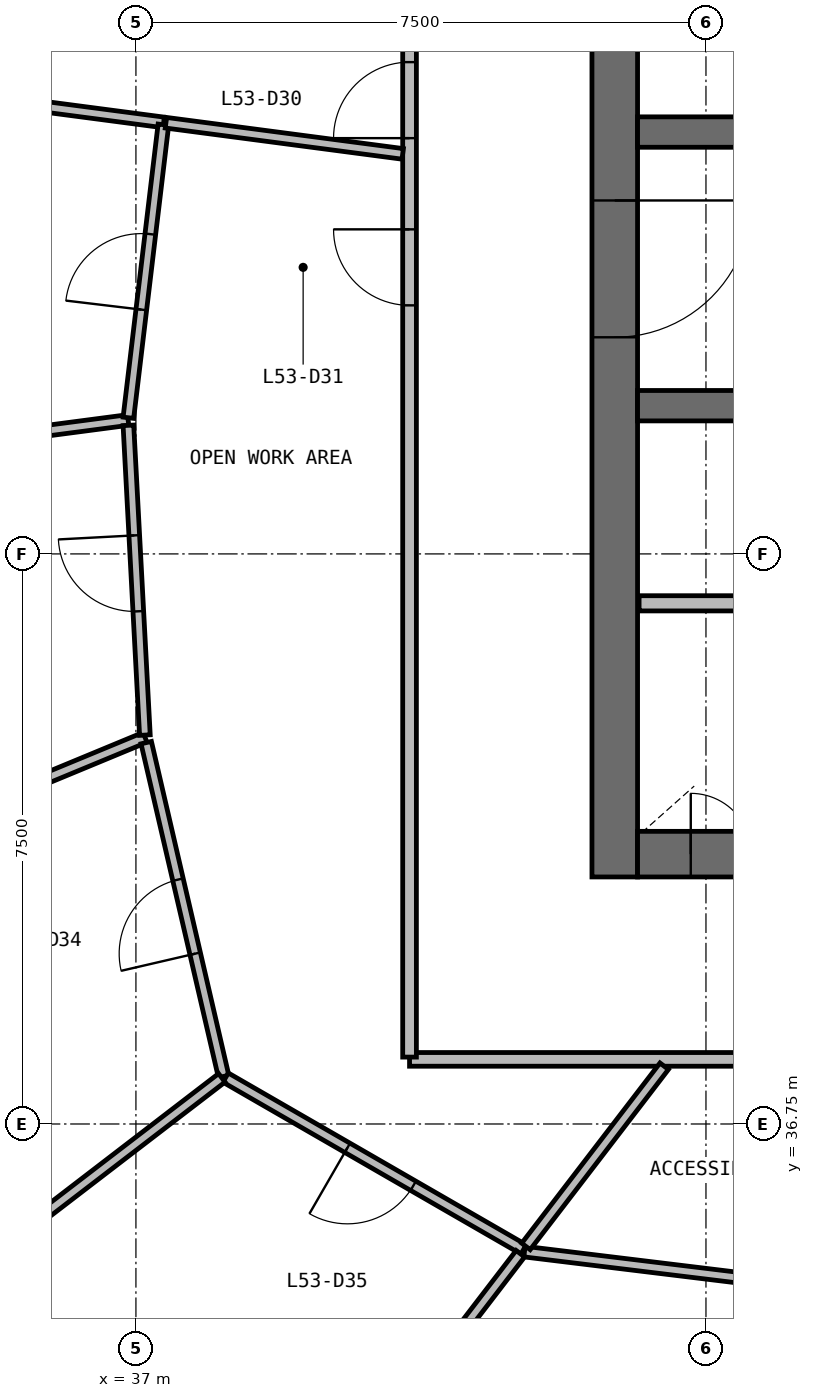
"""IFC4 building model, lengths in metres.
Left out: names, types, materials, properties, quantities, classifications, styles, units other than length and angle.
Written with IfcOpenShell. Run it as: python <this file> out.ifc"""

import sys

from ifc_helpers import new_model, si_unit, direction, frame, frame_2d, origin, place, context, subcontext, project, spatial, rectangle, extrude, source, transform, mapped, element, fill, save


model = new_model("IFC4")
c1 = context("Model", 3, precision=1e-05, world=origin(), true_north=direction((0.0, 1.0)))
c2 = subcontext(c1, "Body", "Model", "MODEL_VIEW")
j1 = project(units=[si_unit("LENGTHUNIT", "METRE"), si_unit("PLANEANGLEUNIT", "RADIAN")], contexts=[c1])
p1 = place(None, origin())
s1 = spatial("IfcSite", under=j1, at=p1, CompositionType="ELEMENT")
p2 = place(p1, origin())
s2 = spatial("IfcBuilding", under=s1, at=p2, CompositionType="ELEMENT")
p3 = place(p2, frame((0.0, 0.0, 218.9)))
s3 = spatial("IfcBuildingStorey", under=s2, at=p3, CompositionType="ELEMENT", Elevation=218.9)
p4 = place(p3, frame((43.3, 56.0, 0.0), z_axis=(0.0, 0.0, 1.0), x_axis=(0.0, -1.0, 0.0)))
e1 = element("IfcWall", 1, at=p4, inside=s3, PredefinedType="SHEAR", context=c2, shape_type="SweptSolid", body=[
    extrude(rectangle(XDim=16.0, YDim=0.6, at=frame_2d((8.0, 0.0))), origin(), (0.0, 0.0, 1.0), 3.9),
])
p5 = place(p4, frame((7.1, 0.0, 0.0)))
e2 = element("IfcOpeningElement", 2, at=p5, cuts=e1, PredefinedType="OPENING", context=c2, shape_type="SweptSolid", body=[
    extrude(rectangle(XDim=1.8, YDim=2.1, at=frame_2d((0.9, 1.05))), frame((0.0, 0.31, 0.0), z_axis=(0.0, -1.0, 0.0), x_axis=(1.0, 0.0, 0.0)), (0.0, 0.0, 1.0), 0.62),
])
p6 = place(p3, frame((43.6, 40.3, 0.0), z_axis=(0.0, 0.0, 1.0), x_axis=(1.0, 0.0, 0.0)))
e3 = element("IfcWall", 3, at=p6, inside=s3, PredefinedType="SHEAR", context=c2, shape_type="SweptSolid", body=[
    extrude(rectangle(XDim=16.8, YDim=0.6, at=frame_2d((8.4, 0.0))), origin(), (0.0, 0.0, 1.0), 3.9),
])
p7 = place(p6, frame((10.3, 0.0, 0.0)))
e4 = element("IfcOpeningElement", 4, at=p7, cuts=e3, PredefinedType="OPENING", context=c2, shape_type="SweptSolid", body=[
    extrude(rectangle(XDim=1.2, YDim=2.1, at=frame_2d((0.6, 1.05))), frame((0.0, 0.31, 0.0), z_axis=(0.0, -1.0, 0.0), x_axis=(1.0, 0.0, 0.0)), (0.0, 0.0, 1.0), 0.62),
])
p8 = place(p6, frame((7.25, 0.0, 0.0)))
e5 = element("IfcOpeningElement", 5, at=p8, cuts=e3, PredefinedType="OPENING", context=c2, shape_type="SweptSolid", body=[
    extrude(rectangle(XDim=1.1, YDim=2.1, at=frame_2d((0.55, 1.05))), frame((0.0, 0.31, 0.0), z_axis=(0.0, -1.0, 0.0), x_axis=(1.0, 0.0, 0.0)), (0.0, 0.0, 1.0), 0.62),
])
p9 = place(p6, frame((0.7, 0.0, 0.0)))
e6 = element("IfcOpeningElement", 6, at=p9, cuts=e3, PredefinedType="OPENING", context=c2, shape_type="SweptSolid", body=[
    extrude(rectangle(XDim=0.8, YDim=2.1, at=frame_2d((0.4, 1.05))), frame((0.0, 0.31, 0.0), z_axis=(0.0, -1.0, 0.0), x_axis=(1.0, 0.0, 0.0)), (0.0, 0.0, 1.0), 0.62),
])
p10 = place(p3, frame((43.6, 49.8, 0.0), z_axis=(0.0, 0.0, 1.0), x_axis=(1.0, 0.0, 0.0)))
e7 = element("IfcWall", 7, at=p10, inside=s3, PredefinedType="SHEAR", context=c2, shape_type="SweptSolid", body=[
    extrude(rectangle(XDim=16.8, YDim=0.4, at=frame_2d((8.4, 0.0))), origin(), (0.0, 0.0, 1.0), 3.9),
])
p11 = place(p10, frame((9.8, 0.0, 0.0)))
e8 = element("IfcOpeningElement", 8, at=p11, cuts=e7, PredefinedType="OPENING", context=c2, shape_type="SweptSolid", body=[
    extrude(rectangle(XDim=1.1, YDim=2.1, at=frame_2d((0.55, 1.05))), frame((0.0, 0.21, 0.0), z_axis=(0.0, -1.0, 0.0), x_axis=(1.0, 0.0, 0.0)), (0.0, 0.0, 1.0), 0.42),
])
p12 = place(p10, frame((12.3, 0.0, 0.0)))
e9 = element("IfcOpeningElement", 9, at=p12, cuts=e7, PredefinedType="OPENING", context=c2, shape_type="SweptSolid", body=[
    extrude(rectangle(XDim=1.1, YDim=2.1, at=frame_2d((0.55, 1.05))), frame((0.0, 0.21, 0.0), z_axis=(0.0, -1.0, 0.0), x_axis=(1.0, 0.0, 0.0)), (0.0, 0.0, 1.0), 0.42),
])
p13 = place(p10, frame((14.8, 0.0, 0.0)))
e10 = element("IfcOpeningElement", 10, at=p13, cuts=e7, PredefinedType="OPENING", context=c2, shape_type="SweptSolid", body=[
    extrude(rectangle(XDim=1.1, YDim=2.1, at=frame_2d((0.55, 1.05))), frame((0.0, 0.21, 0.0), z_axis=(0.0, -1.0, 0.0), x_axis=(1.0, 0.0, 0.0)), (0.0, 0.0, 1.0), 0.42),
])
p14 = place(p10, frame((2.05, 0.0, 0.0)))
e11 = element("IfcOpeningElement", 11, at=p14, cuts=e7, PredefinedType="OPENING", context=c2, shape_type="SweptSolid", body=[
    extrude(rectangle(XDim=0.9, YDim=2.1, at=frame_2d((0.45, 1.05))), frame((0.0, 0.21, 0.0), z_axis=(0.0, -1.0, 0.0), x_axis=(1.0, 0.0, 0.0)), (0.0, 0.0, 1.0), 0.42),
])
p15 = place(p10, frame((5.25, 0.0, 0.0)))
e12 = element("IfcOpeningElement", 12, at=p15, cuts=e7, PredefinedType="OPENING", context=c2, shape_type="SweptSolid", body=[
    extrude(rectangle(XDim=0.9, YDim=2.1, at=frame_2d((0.45, 1.05))), frame((0.0, 0.21, 0.0), z_axis=(0.0, -1.0, 0.0), x_axis=(1.0, 0.0, 0.0)), (0.0, 0.0, 1.0), 0.42),
])
p16 = place(p10, frame((7.85, 0.0, 0.0)))
e13 = element("IfcOpeningElement", 13, at=p16, cuts=e7, PredefinedType="OPENING", context=c2, shape_type="SweptSolid", body=[
    extrude(rectangle(XDim=0.9, YDim=2.1, at=frame_2d((0.45, 1.05))), frame((0.0, 0.21, 0.0), z_axis=(0.0, -1.0, 0.0), x_axis=(1.0, 0.0, 0.0)), (0.0, 0.0, 1.0), 0.42),
])
p17 = place(p3, frame((43.6, 46.2, 0.0), z_axis=(0.0, 0.0, 1.0), x_axis=(1.0, 0.0, 0.0)))
e14 = element("IfcWall", 14, at=p17, inside=s3, PredefinedType="SHEAR", context=c2, shape_type="SweptSolid", body=[
    extrude(rectangle(XDim=16.8, YDim=0.4, at=frame_2d((8.4, 0.0))), origin(), (0.0, 0.0, 1.0), 3.9),
])
p18 = place(p17, frame((9.8, 0.0, 0.0)))
e15 = element("IfcOpeningElement", 15, at=p18, cuts=e14, PredefinedType="OPENING", context=c2, shape_type="SweptSolid", body=[
    extrude(rectangle(XDim=1.1, YDim=2.1, at=frame_2d((0.55, 1.05))), frame((0.0, 0.21, 0.0), z_axis=(0.0, -1.0, 0.0), x_axis=(1.0, 0.0, 0.0)), (0.0, 0.0, 1.0), 0.42),
])
p19 = place(p17, frame((12.3, 0.0, 0.0)))
e16 = element("IfcOpeningElement", 16, at=p19, cuts=e14, PredefinedType="OPENING", context=c2, shape_type="SweptSolid", body=[
    extrude(rectangle(XDim=1.1, YDim=2.1, at=frame_2d((0.55, 1.05))), frame((0.0, 0.21, 0.0), z_axis=(0.0, -1.0, 0.0), x_axis=(1.0, 0.0, 0.0)), (0.0, 0.0, 1.0), 0.42),
])
p20 = place(p17, frame((14.8, 0.0, 0.0)))
e17 = element("IfcOpeningElement", 17, at=p20, cuts=e14, PredefinedType="OPENING", context=c2, shape_type="SweptSolid", body=[
    extrude(rectangle(XDim=1.1, YDim=2.1, at=frame_2d((0.55, 1.05))), frame((0.0, 0.21, 0.0), z_axis=(0.0, -1.0, 0.0), x_axis=(1.0, 0.0, 0.0)), (0.0, 0.0, 1.0), 0.42),
])
p21 = place(p17, frame((3.45, 0.0, 0.0)))
e18 = element("IfcOpeningElement", 18, at=p21, cuts=e14, PredefinedType="OPENING", context=c2, shape_type="SweptSolid", body=[
    extrude(rectangle(XDim=0.9, YDim=2.1, at=frame_2d((0.45, 1.05))), frame((0.0, 0.21, 0.0), z_axis=(0.0, -1.0, 0.0), x_axis=(1.0, 0.0, 0.0)), (0.0, 0.0, 1.0), 0.42),
])
p22 = place(p17, frame((7.85, 0.0, 0.0)))
e19 = element("IfcOpeningElement", 19, at=p22, cuts=e14, PredefinedType="OPENING", context=c2, shape_type="SweptSolid", body=[
    extrude(rectangle(XDim=0.9, YDim=2.1, at=frame_2d((0.45, 1.05))), frame((0.0, 0.21, 0.0), z_axis=(0.0, -1.0, 0.0), x_axis=(1.0, 0.0, 0.0)), (0.0, 0.0, 1.0), 0.42),
])
p23 = place(p3, frame((45.47, 43.6, 0.0), z_axis=(0.0, 0.0, 1.0), x_axis=(-1.0, 0.0, 0.0)))
e20 = element("IfcWall", 20, at=p23, inside=s3, PredefinedType="SOLIDWALL", context=c2, shape_type="SweptSolid", body=[
    extrude(rectangle(XDim=1.85, YDim=0.2, at=frame_2d((0.925, 0.0))), origin(), (0.0, 0.0, 1.0), 3.58),
])
p24 = place(p3, frame((63.4, 37.6, 0.0), z_axis=(0.0, 0.0, 1.0), x_axis=(-1.0, 0.0, 0.0)))
e21 = element("IfcWall", 21, at=p24, inside=s3, PredefinedType="PARTITIONING", context=c2, shape_type="SweptSolid", body=[
    extrude(rectangle(XDim=22.8, YDim=0.18, at=frame_2d((11.4, 0.0))), origin(), (0.0, 0.0, 1.0), 2.88),
])
p25 = place(p24, frame((16.05, 0.0, 0.0)))
e22 = element("IfcOpeningElement", 22, at=p25, cuts=e21, PredefinedType="OPENING", context=c2, shape_type="SweptSolid", body=[
    extrude(rectangle(XDim=0.9, YDim=2.1, at=frame_2d((0.45, 1.05))), frame((0.0, 0.1, 0.0), z_axis=(0.0, -1.0, 0.0), x_axis=(1.0, 0.0, 0.0)), (0.0, 0.0, 1.0), 0.2),
])
p26 = place(p24, frame((13.05, 0.0, 0.0)))
e23 = element("IfcOpeningElement", 23, at=p26, cuts=e21, PredefinedType="OPENING", context=c2, shape_type="SweptSolid", body=[
    extrude(rectangle(XDim=0.9, YDim=2.1, at=frame_2d((0.45, 1.05))), frame((0.0, 0.1, 0.0), z_axis=(0.0, -1.0, 0.0), x_axis=(1.0, 0.0, 0.0)), (0.0, 0.0, 1.0), 0.2),
])
p27 = place(p24, frame((10.95, 0.0, 0.0)))
e24 = element("IfcOpeningElement", 24, at=p27, cuts=e21, PredefinedType="OPENING", context=c2, shape_type="SweptSolid", body=[
    extrude(rectangle(XDim=1.0, YDim=2.1, at=frame_2d((0.5, 1.05))), frame((0.0, 0.1, 0.0), z_axis=(0.0, -1.0, 0.0), x_axis=(1.0, 0.0, 0.0)), (0.0, 0.0, 1.0), 0.2),
])
p28 = place(p24, frame((5.75, 0.0, 0.0)))
e25 = element("IfcOpeningElement", 25, at=p28, cuts=e21, PredefinedType="OPENING", context=c2, shape_type="SweptSolid", body=[
    extrude(rectangle(XDim=1.0, YDim=2.1, at=frame_2d((0.5, 1.05))), frame((0.0, 0.1, 0.0), z_axis=(0.0, -1.0, 0.0), x_axis=(1.0, 0.0, 0.0)), (0.0, 0.0, 1.0), 0.2),
])
p29 = place(p3, frame((40.6, 37.63, 0.0), z_axis=(0.0, 0.0, 1.0), x_axis=(0.0, 1.0, 0.0)))
e26 = element("IfcWall", 26, at=p29, inside=s3, PredefinedType="PARTITIONING", context=c2, shape_type="SweptSolid", body=[
    extrude(rectangle(XDim=20.74, YDim=0.18, at=frame_2d((10.37, 0.0))), origin(), (0.0, 0.0, 1.0), 2.88),
])
p30 = place(p29, frame((12.09, 0.0, 0.0)))
e27 = element("IfcOpeningElement", 27, at=p30, cuts=e26, PredefinedType="OPENING", context=c2, shape_type="SweptSolid", body=[
    extrude(rectangle(XDim=1.0, YDim=2.1, at=frame_2d((0.5, 1.05))), frame((0.0, 0.1, 0.0), z_axis=(0.0, -1.0, 0.0), x_axis=(1.0, 0.0, 0.0)), (0.0, 0.0, 1.0), 0.2),
])
p31 = place(p29, frame((9.89, 0.0, 0.0)))
e28 = element("IfcOpeningElement", 28, at=p31, cuts=e26, PredefinedType="OPENING", context=c2, shape_type="SweptSolid", body=[
    extrude(rectangle(XDim=1.0, YDim=2.1, at=frame_2d((0.5, 1.05))), frame((0.0, 0.1, 0.0), z_axis=(0.0, -1.0, 0.0), x_axis=(1.0, 0.0, 0.0)), (0.0, 0.0, 1.0), 0.2),
])
p32 = place(p3, frame((37.12, 41.836, 0.0), z_axis=(0.0, 0.0, 1.0), x_axis=(-0.923888768436, -0.382661134108, 0.0)))
e29 = element("IfcWall", 29, at=p32, inside=s3, PredefinedType="PARTITIONING", context=c2, shape_type="SweptSolid", body=[
    extrude(rectangle(XDim=5.902, YDim=0.14, at=frame_2d((2.951, 0.0))), origin(), (0.0, 0.0, 1.0), 2.88),
])
p33 = place(p3, frame((36.897, 46.012, 0.0), z_axis=(0.0, 0.0, 1.0), x_axis=(-0.991443375062, -0.130537481379, 0.0)))
e30 = element("IfcWall", 30, at=p33, inside=s3, PredefinedType="PARTITIONING", context=c2, shape_type="SweptSolid", body=[
    extrude(rectangle(XDim=5.557, YDim=0.14, at=frame_2d((2.778, 0.0))), origin(), (0.0, 0.0, 1.0), 2.88),
])
p34 = place(p3, frame((38.154, 37.375, 0.0), z_axis=(0.0, 0.0, 1.0), x_axis=(-0.225883778656, 0.974154258082, 0.0)))
e31 = element("IfcWall", 31, at=p34, inside=s3, PredefinedType="PARTITIONING", context=c2, shape_type="SweptSolid", body=[
    extrude(rectangle(XDim=4.508, YDim=0.14, at=frame_2d((2.254, 0.0))), origin(), (0.0, 0.0, 1.0), 2.88),
])
p35 = place(p34, frame((1.658, 0.0, 0.0)))
e32 = element("IfcOpeningElement", 32, at=p35, cuts=e31, PredefinedType="OPENING", context=c2, shape_type="SweptSolid", body=[
    extrude(rectangle(XDim=1.0, YDim=2.1, at=frame_2d((0.5, 1.05))), frame((0.0, 0.08, 0.0), z_axis=(0.0, -1.0, 0.0), x_axis=(1.0, 0.0, 0.0)), (0.0, 0.0, 1.0), 0.16),
])
p36 = place(p3, frame((42.101, 35.099, 0.0), z_axis=(0.0, 0.0, 1.0), x_axis=(-0.866291519496, 0.499538790535, 0.0)))
e33 = element("IfcWall", 33, at=p36, inside=s3, PredefinedType="PARTITIONING", context=c2, shape_type="SweptSolid", body=[
    extrude(rectangle(XDim=4.527, YDim=0.14, at=frame_2d((2.263, 0.0))), origin(), (0.0, 0.0, 1.0), 2.88),
])
p37 = place(p36, frame((1.677, 0.0, 0.0)))
e34 = element("IfcOpeningElement", 34, at=p37, cuts=e33, PredefinedType="OPENING", context=c2, shape_type="SweptSolid", body=[
    extrude(rectangle(XDim=1.0, YDim=2.1, at=frame_2d((0.5, 1.05))), frame((0.0, 0.08, 0.0), z_axis=(0.0, -1.0, 0.0), x_axis=(1.0, 0.0, 0.0)), (0.0, 0.0, 1.0), 0.16),
])
p38 = place(p3, frame((37.365, 49.927, 0.0), z_axis=(0.0, 0.0, 1.0), x_axis=(-0.991445679667, 0.130519976512, 0.0)))
e35 = element("IfcWall", 35, at=p38, inside=s3, PredefinedType="PARTITIONING", context=c2, shape_type="SweptSolid", body=[
    extrude(rectangle(XDim=4.534, YDim=0.14, at=frame_2d((2.267, 0.0))), origin(), (0.0, 0.0, 1.0), 2.88),
])
p39 = place(p3, frame((38.13, 37.357, 0.0), z_axis=(0.0, 0.0, 1.0), x_axis=(-0.793359272934, -0.60875369736, 0.0)))
e36 = element("IfcWall", 36, at=p39, inside=s3, PredefinedType="PARTITIONING", context=c2, shape_type="SweptSolid", body=[
    extrude(rectangle(XDim=4.502, YDim=0.14, at=frame_2d((2.251, 0.0))), origin(), (0.0, 0.0, 1.0), 2.88),
])
p40 = place(p3, frame((42.058, 35.043, 0.0), z_axis=(0.0, 0.0, 1.0), x_axis=(-0.608794526213, -0.793327942816, 0.0)))
e37 = element("IfcWall", 37, at=p40, inside=s3, PredefinedType="PARTITIONING", context=c2, shape_type="SweptSolid", body=[
    extrude(rectangle(XDim=4.419, YDim=0.14, at=frame_2d((2.209, 0.0))), origin(), (0.0, 0.0, 1.0), 2.88),
])
p41 = place(p40, frame((1.65, 0.0, 0.0)))
e38 = element("IfcOpeningElement", 38, at=p41, cuts=e37, PredefinedType="OPENING", context=c2, shape_type="SweptSolid", body=[
    extrude(rectangle(XDim=1.0, YDim=2.1, at=frame_2d((0.5, 1.05))), frame((0.0, 0.08, 0.0), z_axis=(0.0, -1.0, 0.0), x_axis=(1.0, 0.0, 0.0)), (0.0, 0.0, 1.0), 0.16),
])
p42 = place(p3, frame((42.112, 35.071, 0.0), z_axis=(0.0, 0.0, 1.0), x_axis=(0.992646700661, -0.121047625618, 0.0)))
e39 = element("IfcWall", 39, at=p42, inside=s3, PredefinedType="PARTITIONING", context=c2, shape_type="SweptSolid", body=[
    extrude(rectangle(XDim=4.346, YDim=0.14, at=frame_2d((2.173, 0.0))), origin(), (0.0, 0.0, 1.0), 2.88),
])
p43 = place(p3, frame((37.118, 41.866, 0.0), z_axis=(0.0, 0.0, 1.0), x_axis=(-0.053180494254, 0.998584916285, 0.0)))
e40 = element("IfcWall", 40, at=p43, inside=s3, PredefinedType="PARTITIONING", context=c2, shape_type="SweptSolid", body=[
    extrude(rectangle(XDim=4.081, YDim=0.14, at=frame_2d((2.041, 0.0))), origin(), (0.0, 0.0, 1.0), 2.88),
])
p44 = place(p43, frame((1.631, 0.0, 0.0)))
e41 = element("IfcOpeningElement", 41, at=p44, cuts=e40, PredefinedType="OPENING", context=c2, shape_type="SweptSolid", body=[
    extrude(rectangle(XDim=1.0, YDim=2.1, at=frame_2d((0.5, 1.05))), frame((0.0, 0.08, 0.0), z_axis=(0.0, -1.0, 0.0), x_axis=(1.0, 0.0, 0.0)), (0.0, 0.0, 1.0), 0.16),
])
p45 = place(p3, frame((36.901, 46.042, 0.0), z_axis=(0.0, 0.0, 1.0), x_axis=(0.118646859406, 0.992936514966, 0.0)))
e42 = element("IfcWall", 42, at=p45, inside=s3, PredefinedType="PARTITIONING", context=c2, shape_type="SweptSolid", body=[
    extrude(rectangle(XDim=3.883, YDim=0.14, at=frame_2d((1.941, 0.0))), origin(), (0.0, 0.0, 1.0), 2.88),
])
p46 = place(p45, frame((1.433, 0.0, 0.0)))
e43 = element("IfcOpeningElement", 43, at=p46, cuts=e42, PredefinedType="OPENING", context=c2, shape_type="SweptSolid", body=[
    extrude(rectangle(XDim=1.0, YDim=2.1, at=frame_2d((0.5, 1.05))), frame((0.0, 0.08, 0.0), z_axis=(0.0, -1.0, 0.0), x_axis=(1.0, 0.0, 0.0)), (0.0, 0.0, 1.0), 0.16),
])
p47 = place(p3, frame((40.51, 49.513, 0.0), z_axis=(0.0, 0.0, 1.0), x_axis=(-0.991443713746, 0.13053490902, 0.0)))
e44 = element("IfcWall", 44, at=p47, inside=s3, PredefinedType="PARTITIONING", context=c2, shape_type="SweptSolid", body=[
    extrude(rectangle(XDim=3.142, YDim=0.14, at=frame_2d((1.571, 0.0))), origin(), (0.0, 0.0, 1.0), 2.88),
])
p48 = place(p3, frame((43.951, 37.51, 0.0), z_axis=(0.0, 0.0, 1.0), x_axis=(-0.60873508117, -0.793373557004, 0.0)))
e45 = element("IfcWall", 45, at=p48, inside=s3, PredefinedType="PARTITIONING", context=c2, shape_type="SweptSolid", body=[
    extrude(rectangle(XDim=2.988, YDim=0.14, at=frame_2d((1.494, 0.0))), origin(), (0.0, 0.0, 1.0), 2.88),
])
m1 = source(origin(), c2, "Body", "SweptSolid", [
    extrude(rectangle(XDim=1.8, YDim=2.1, at=frame_2d((0.9, 1.05))), frame((0.0, 0.025, 0.0), z_axis=(0.0, -1.0, 0.0), x_axis=(1.0, 0.0, 0.0)), (0.0, 0.0, 1.0), 0.05),
])
p49 = place(p5, origin())
e46 = element("IfcDoor", 46, at=p49, inside=s3, OperationType="SINGLE_SWING_LEFT", PredefinedType="DOOR", context=c2, shape_type="MappedRepresentation", body=[
    mapped(m1, transform((0.0, 0.0, 0.0), scale=1.0)),
])
fill(e2, e46)
m2 = source(origin(), c2, "Body", "SweptSolid", [
    extrude(rectangle(XDim=0.8, YDim=2.1, at=frame_2d((0.4, 1.05))), frame((0.0, 0.025, 0.0), z_axis=(0.0, -1.0, 0.0), x_axis=(1.0, 0.0, 0.0)), (0.0, 0.0, 1.0), 0.05),
])
p50 = place(p9, origin())
e47 = element("IfcDoor", 47, at=p50, inside=s3, OperationType="SINGLE_SWING_LEFT", PredefinedType="DOOR", context=c2, shape_type="MappedRepresentation", body=[
    mapped(m2, transform((0.0, 0.0, 0.0), scale=1.0)),
])
fill(e6, e47)
m3 = source(origin(), c2, "Body", "SweptSolid", [
    extrude(rectangle(XDim=1.0, YDim=2.1, at=frame_2d((0.5, 1.05))), frame((0.0, 0.025, 0.0), z_axis=(0.0, -1.0, 0.0), x_axis=(1.0, 0.0, 0.0)), (0.0, 0.0, 1.0), 0.05),
])
p51 = place(p30, origin())
e48 = element("IfcDoor", 48, at=p51, inside=s3, OperationType="SINGLE_SWING_LEFT", PredefinedType="DOOR", context=c2, shape_type="MappedRepresentation", body=[
    mapped(m3, transform((0.0, 0.0, 0.0), scale=1.0)),
])
fill(e27, e48)
p52 = place(p31, origin())
e49 = element("IfcDoor", 49, at=p52, inside=s3, OperationType="SINGLE_SWING_RIGHT", PredefinedType="DOOR", context=c2, shape_type="MappedRepresentation", body=[
    mapped(m3, transform((0.0, 0.0, 0.0), scale=1.0)),
])
fill(e28, e49)
p53 = place(p46, origin())
e50 = element("IfcDoor", 50, at=p53, inside=s3, OperationType="SINGLE_SWING_LEFT", PredefinedType="DOOR", context=c2, shape_type="MappedRepresentation", body=[
    mapped(m3, transform((0.0, 0.0, 0.0), scale=1.0)),
])
fill(e43, e50)
p54 = place(p44, origin())
e51 = element("IfcDoor", 51, at=p54, inside=s3, OperationType="SINGLE_SWING_RIGHT", PredefinedType="DOOR", context=c2, shape_type="MappedRepresentation", body=[
    mapped(m3, transform((0.0, 0.0, 0.0), scale=1.0)),
])
fill(e41, e51)
p55 = place(p35, origin())
e52 = element("IfcDoor", 52, at=p55, inside=s3, OperationType="SINGLE_SWING_LEFT", PredefinedType="DOOR", context=c2, shape_type="MappedRepresentation", body=[
    mapped(m3, transform((0.0, 0.0, 0.0), scale=1.0)),
])
fill(e32, e52)
p56 = place(p37, origin())
e53 = element("IfcDoor", 53, at=p56, inside=s3, OperationType="SINGLE_SWING_RIGHT", PredefinedType="DOOR", context=c2, shape_type="MappedRepresentation", body=[
    mapped(m3, transform((0.0, 0.0, 0.0), scale=1.0)),
])
fill(e34, e53)
save(model, sys.argv[1])
